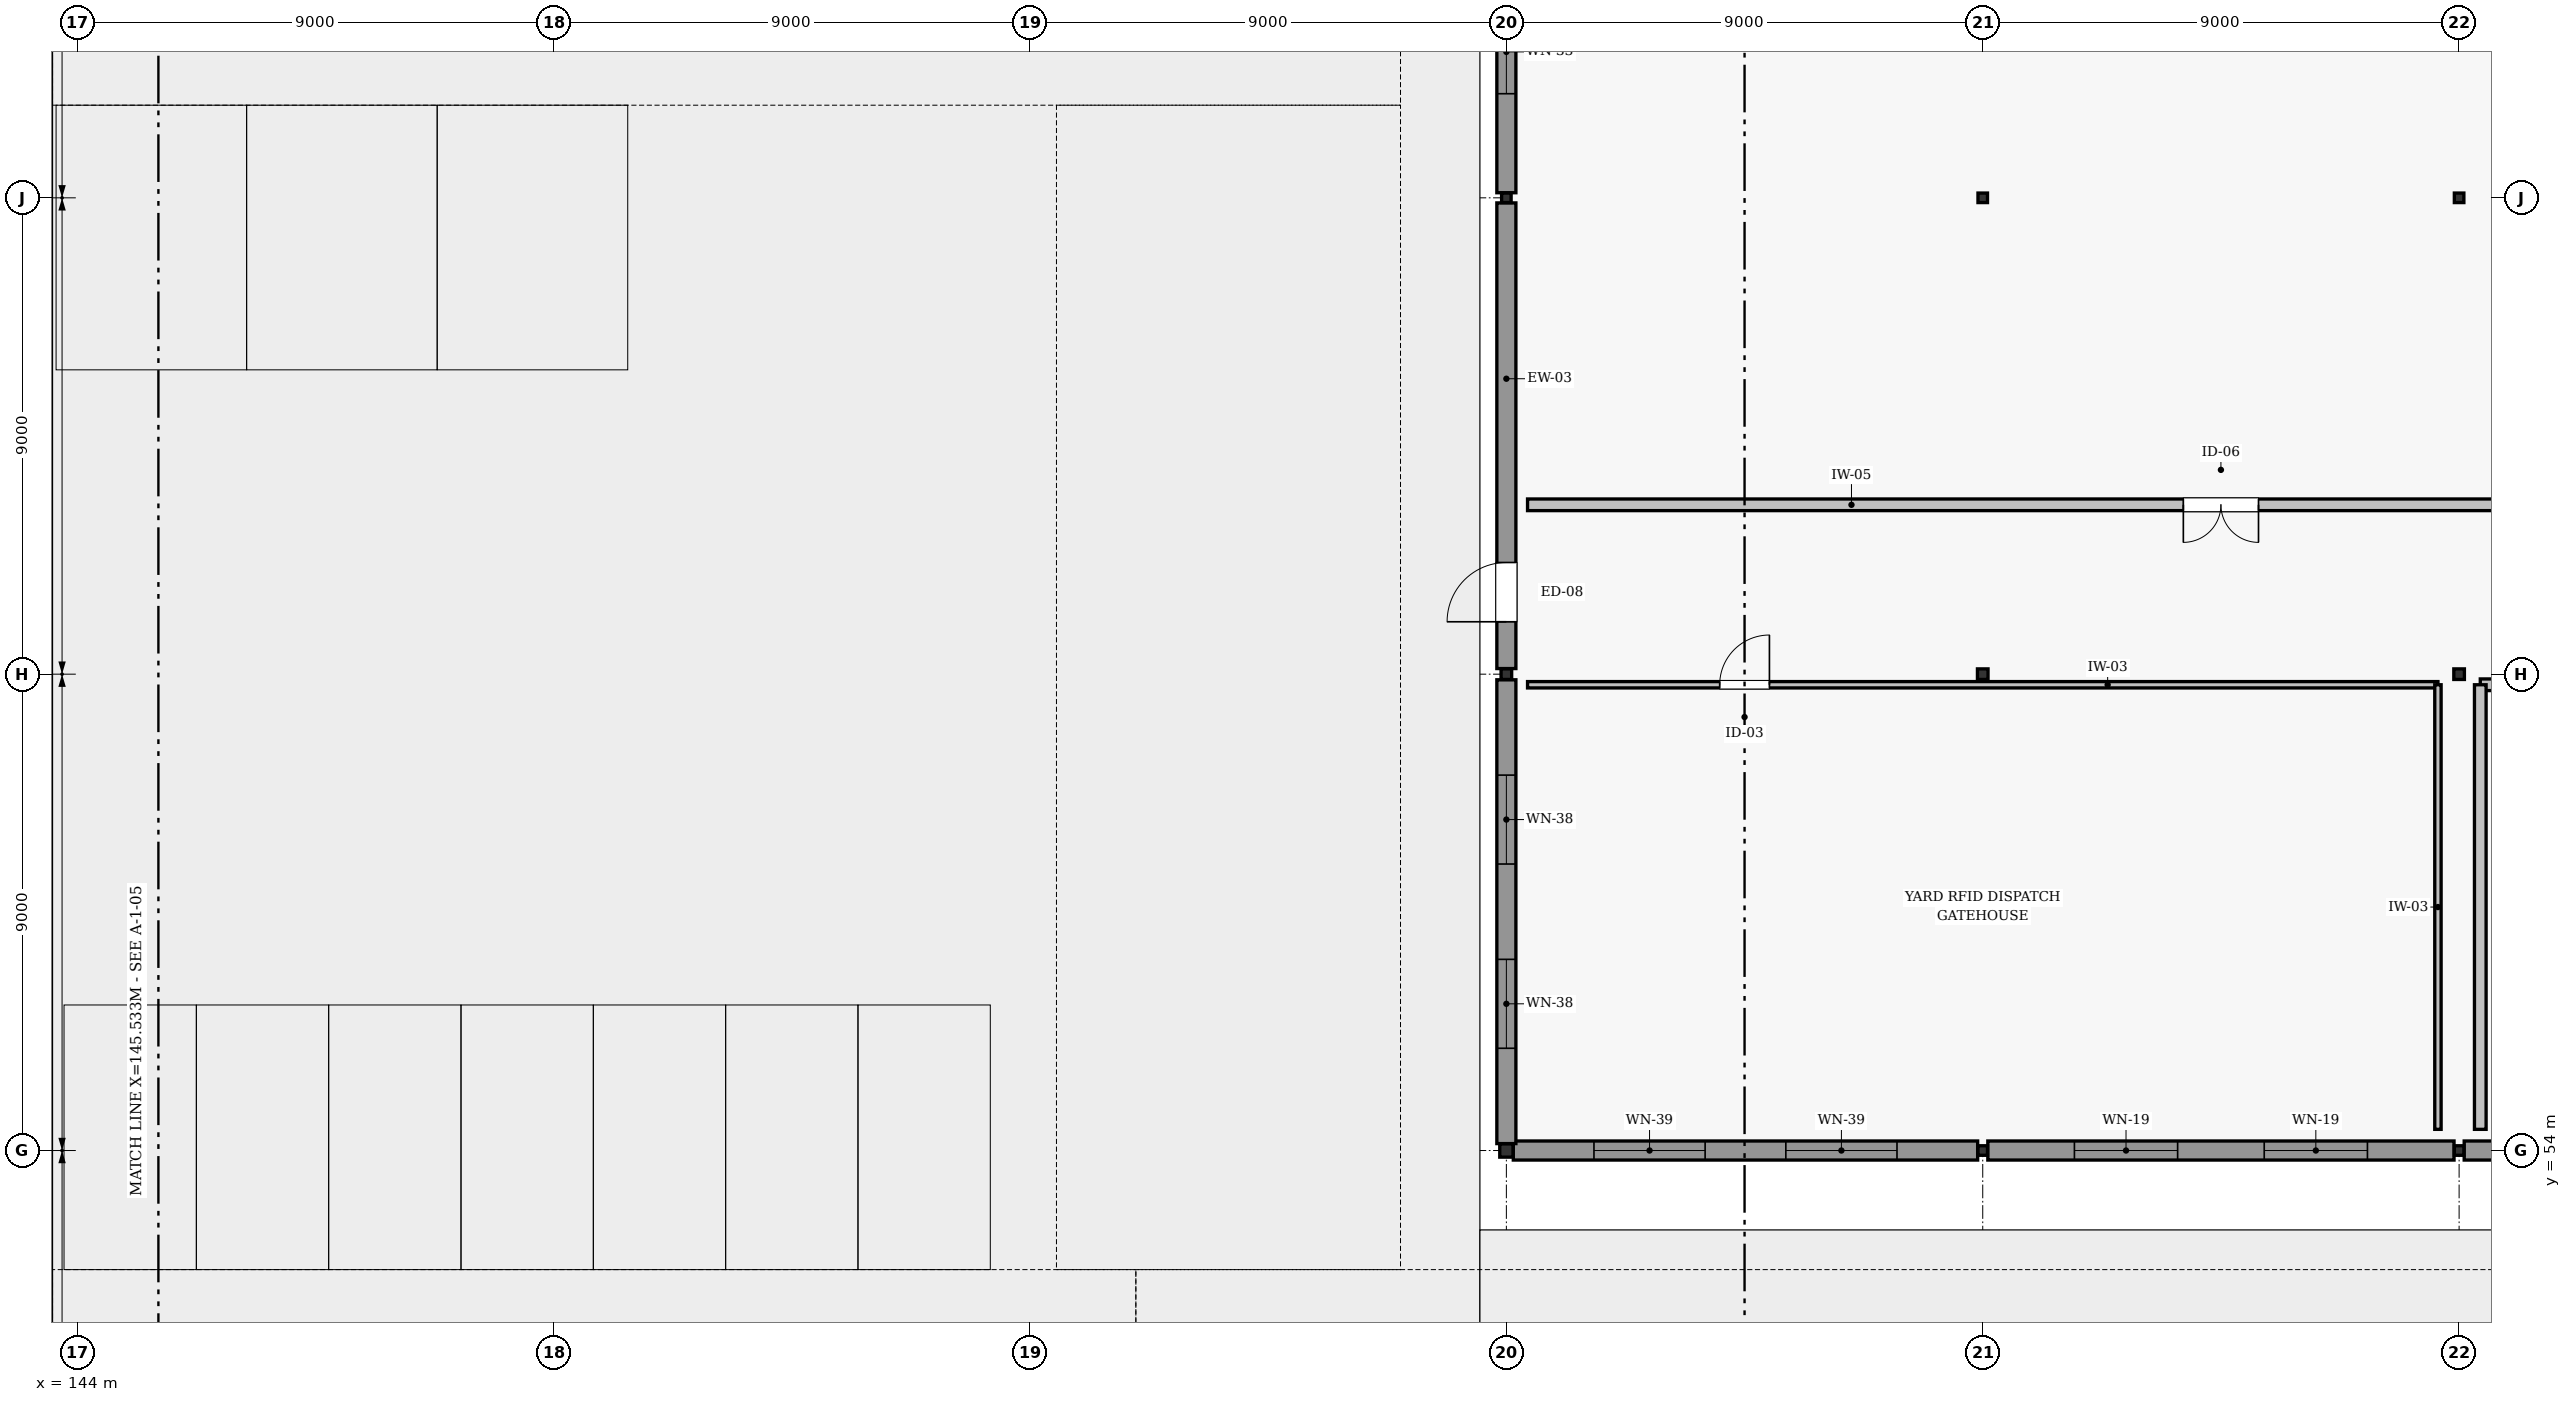
"""IFC4 building model, lengths in metres.
Left out: names, types, materials, properties, quantities, classifications, styles, units other than length and angle.
Written with IfcOpenShell. Run it as: python <this file> out.ifc"""

import sys

from ifc_helpers import new_model, si_unit, direction, frame, frame_2d, origin, origin_2d, place, context, subcontext, project, spatial, rectangle, hollow_rectangle, extrude, element, fill, save


model = new_model("IFC4")
c1 = context("Model", 3, precision=1e-05, world=origin(), true_north=direction((0.0, 1.0)))
c2 = subcontext(c1, "Body", "Model", "MODEL_VIEW")
j1 = project(units=[si_unit("LENGTHUNIT", "METRE"), si_unit("PLANEANGLEUNIT", "RADIAN")], contexts=[c1])
p1 = place(None, origin())
s1 = spatial("IfcSite", under=j1, at=p1, CompositionType="ELEMENT")
p2 = place(p1, origin())
s2 = spatial("IfcBuilding", under=s1, at=p2, CompositionType="ELEMENT")
p3 = place(p2, origin())
s3 = spatial("IfcBuildingStorey", under=s2, at=p3, CompositionType="ELEMENT", Elevation=0.0)
p4 = place(p3, frame((171.0, 54.0, 0.0), z_axis=(0.0, 0.0, 1.0), x_axis=(1.0, 0.0, 0.0)))
e1 = element("IfcColumn", 1, at=p4, inside=s3, PredefinedType="COLUMN", context=c2, shape_type="SweptSolid", body=[
    extrude(hollow_rectangle(XDim=0.25, YDim=0.25, WallThickness=0.01, InnerFilletRadius=0.01, OuterFilletRadius=0.02, at=origin_2d()), origin(), (0.0, 0.0, 1.0), 4.8),
])
p5 = place(p3, frame((171.0, 63.0, 0.0), z_axis=(0.0, 0.0, 1.0), x_axis=(1.0, 0.0, 0.0)))
e2 = element("IfcColumn", 2, at=p5, inside=s3, PredefinedType="COLUMN", context=c2, shape_type="SweptSolid", body=[
    extrude(hollow_rectangle(XDim=0.2, YDim=0.2, WallThickness=0.008, InnerFilletRadius=0.008, OuterFilletRadius=0.016, at=origin_2d()), origin(), (0.0, 0.0, 1.0), 4.8),
])
for number, where, z_axis, x_axis in (
    (3, (171.0, 72.0, 0.0), (0.0, 0.0, 1.0), (1.0, 0.0, 0.0)),
    (4, (180.0, 54.0, 0.0), (0.0, 0.0, 1.0), (1.0, 0.0, 0.0)),
):
    element("IfcColumn", number, at=place(p3, frame(where, z_axis=z_axis, x_axis=x_axis)), inside=s3, PredefinedType="COLUMN", context=c2, shape_type="SweptSolid", body=[
        extrude(hollow_rectangle(XDim=0.18, YDim=0.18, WallThickness=0.008, InnerFilletRadius=0.008, OuterFilletRadius=0.016, at=origin_2d()), origin(), (0.0, 0.0, 1.0), 4.8),
    ])
p6 = place(p3, frame((180.0, 63.0, 0.0), z_axis=(0.0, 0.0, 1.0), x_axis=(1.0, 0.0, 0.0)))
e5 = element("IfcColumn", 5, at=p6, inside=s3, PredefinedType="COLUMN", context=c2, shape_type="SweptSolid", body=[
    extrude(hollow_rectangle(XDim=0.2, YDim=0.2, WallThickness=0.008, InnerFilletRadius=0.008, OuterFilletRadius=0.016, at=origin_2d()), origin(), (0.0, 0.0, 1.0), 4.8),
])
for number, where, z_axis, x_axis in (
    (6, (180.0, 72.0, 0.0), (0.0, 0.0, 1.0), (1.0, 0.0, 0.0)),
    (7, (189.0, 54.0, 0.0), (0.0, 0.0, 1.0), (1.0, 0.0, 0.0)),
):
    element("IfcColumn", number, at=place(p3, frame(where, z_axis=z_axis, x_axis=x_axis)), inside=s3, PredefinedType="COLUMN", context=c2, shape_type="SweptSolid", body=[
        extrude(hollow_rectangle(XDim=0.18, YDim=0.18, WallThickness=0.008, InnerFilletRadius=0.008, OuterFilletRadius=0.016, at=origin_2d()), origin(), (0.0, 0.0, 1.0), 4.8),
    ])
p7 = place(p3, frame((189.0, 63.0, 0.0), z_axis=(0.0, 0.0, 1.0), x_axis=(1.0, 0.0, 0.0)))
e8 = element("IfcColumn", 8, at=p7, inside=s3, PredefinedType="COLUMN", context=c2, shape_type="SweptSolid", body=[
    extrude(hollow_rectangle(XDim=0.2, YDim=0.2, WallThickness=0.008, InnerFilletRadius=0.008, OuterFilletRadius=0.016, at=origin_2d()), origin(), (0.0, 0.0, 1.0), 4.8),
])
p8 = place(p3, frame((189.0, 72.0, 0.0), z_axis=(0.0, 0.0, 1.0), x_axis=(1.0, 0.0, 0.0)))
e9 = element("IfcColumn", 9, at=p8, inside=s3, PredefinedType="COLUMN", context=c2, shape_type="SweptSolid", body=[
    extrude(hollow_rectangle(XDim=0.18, YDim=0.18, WallThickness=0.008, InnerFilletRadius=0.008, OuterFilletRadius=0.016, at=origin_2d()), origin(), (0.0, 0.0, 1.0), 4.8),
])
p9 = place(p3, frame((171.131, 54.0, 0.0), z_axis=(0.0, 0.0, 1.0), x_axis=(1.0, 0.0, 0.0)))
e10 = element("IfcWall", 10, at=p9, inside=s3, PredefinedType="SOLIDWALL", context=c2, shape_type="SweptSolid", body=[
    extrude(rectangle(XDim=8.773, YDim=0.36, at=frame_2d((4.386, 0.0))), origin(), (0.0, 0.0, 1.0), 4.142),
])
p10 = place(p9, frame((1.524, 0.0, 0.75)))
e11 = element("IfcOpeningElement", 11, at=p10, cuts=e10, PredefinedType="OPENING", context=c2, shape_type="SweptSolid", body=[
    extrude(rectangle(XDim=2.1, YDim=2.12, at=frame_2d((1.05, 1.06))), frame((0.0, 0.19, 0.0), z_axis=(0.0, -1.0, 0.0), x_axis=(1.0, 0.0, 0.0)), (0.0, 0.0, 1.0), 0.38),
])
p11 = place(p9, frame((5.149, 0.0, 0.75)))
e12 = element("IfcOpeningElement", 12, at=p11, cuts=e10, PredefinedType="OPENING", context=c2, shape_type="SweptSolid", body=[
    extrude(rectangle(XDim=2.1, YDim=2.12, at=frame_2d((1.05, 1.06))), frame((0.0, 0.19, 0.0), z_axis=(0.0, -1.0, 0.0), x_axis=(1.0, 0.0, 0.0)), (0.0, 0.0, 1.0), 0.38),
])
p12 = place(p3, frame((180.096, 54.0, 0.0), z_axis=(0.0, 0.0, 1.0), x_axis=(1.0, 0.0, 0.0)))
e13 = element("IfcWall", 13, at=p12, inside=s3, PredefinedType="SOLIDWALL", context=c2, shape_type="SweptSolid", body=[
    extrude(rectangle(XDim=8.808, YDim=0.36, at=frame_2d((4.404, 0.0))), origin(), (0.0, 0.0, 1.0), 4.142),
])
p13 = place(p12, frame((1.636, 0.0, 0.8)))
e14 = element("IfcOpeningElement", 14, at=p13, cuts=e13, PredefinedType="OPENING", context=c2, shape_type="SweptSolid", body=[
    extrude(rectangle(XDim=1.95, YDim=2.05, at=frame_2d((0.975, 1.025))), frame((0.0, 0.19, 0.0), z_axis=(0.0, -1.0, 0.0), x_axis=(1.0, 0.0, 0.0)), (0.0, 0.0, 1.0), 0.38),
])
p14 = place(p12, frame((5.222, 0.0, 0.8)))
e15 = element("IfcOpeningElement", 15, at=p14, cuts=e13, PredefinedType="OPENING", context=c2, shape_type="SweptSolid", body=[
    extrude(rectangle(XDim=1.95, YDim=2.05, at=frame_2d((0.975, 1.025))), frame((0.0, 0.19, 0.0), z_axis=(0.0, -1.0, 0.0), x_axis=(1.0, 0.0, 0.0)), (0.0, 0.0, 1.0), 0.38),
])
p15 = place(p3, frame((189.096, 54.0, 0.0), z_axis=(0.0, 0.0, 1.0), x_axis=(1.0, 0.0, 0.0)))
e16 = element("IfcWall", 16, at=p15, inside=s3, PredefinedType="SOLIDWALL", context=c2, shape_type="SweptSolid", body=[
    extrude(rectangle(XDim=8.808, YDim=0.36, at=frame_2d((4.404, 0.0))), origin(), (0.0, 0.0, 1.0), 4.142),
])
p16 = place(p15, frame((1.703, 0.0, 0.8)))
e17 = element("IfcOpeningElement", 17, at=p16, cuts=e16, PredefinedType="OPENING", context=c2, shape_type="SweptSolid", body=[
    extrude(rectangle(XDim=1.85, YDim=1.98, at=frame_2d((0.925, 0.99))), frame((0.0, 0.19, 0.0), z_axis=(0.0, -1.0, 0.0), x_axis=(1.0, 0.0, 0.0)), (0.0, 0.0, 1.0), 0.38),
])
p17 = place(p15, frame((5.255, 0.0, 0.8)))
e18 = element("IfcOpeningElement", 18, at=p17, cuts=e16, PredefinedType="OPENING", context=c2, shape_type="SweptSolid", body=[
    extrude(rectangle(XDim=1.85, YDim=1.98, at=frame_2d((0.925, 0.99))), frame((0.0, 0.19, 0.0), z_axis=(0.0, -1.0, 0.0), x_axis=(1.0, 0.0, 0.0)), (0.0, 0.0, 1.0), 0.38),
])
p18 = place(p3, frame((171.0, 54.131, 0.0), z_axis=(0.0, 0.0, 1.0), x_axis=(0.0, 1.0, 0.0)))
e19 = element("IfcWall", 19, at=p18, inside=s3, PredefinedType="SOLIDWALL", context=c2, shape_type="SweptSolid", body=[
    extrude(rectangle(XDim=8.763, YDim=0.36, at=frame_2d((4.381, 0.0))), origin(), (0.0, 0.0, 1.0), 4.142),
])
p19 = place(p18, frame((1.801, 0.0, 0.85)))
e20 = element("IfcOpeningElement", 20, at=p19, cuts=e19, PredefinedType="OPENING", context=c2, shape_type="SweptSolid", body=[
    extrude(rectangle(XDim=1.68, YDim=1.66, at=frame_2d((0.84, 0.83))), frame((0.0, 0.19, 0.0), z_axis=(0.0, -1.0, 0.0), x_axis=(1.0, 0.0, 0.0)), (0.0, 0.0, 1.0), 0.38),
])
p20 = place(p18, frame((5.282, 0.0, 0.85)))
e21 = element("IfcOpeningElement", 21, at=p20, cuts=e19, PredefinedType="OPENING", context=c2, shape_type="SweptSolid", body=[
    extrude(rectangle(XDim=1.68, YDim=1.66, at=frame_2d((0.84, 0.83))), frame((0.0, 0.19, 0.0), z_axis=(0.0, -1.0, 0.0), x_axis=(1.0, 0.0, 0.0)), (0.0, 0.0, 1.0), 0.38),
])
p21 = place(p3, frame((171.0, 63.106, 0.0), z_axis=(0.0, 0.0, 1.0), x_axis=(0.0, 1.0, 0.0)))
e22 = element("IfcWall", 22, at=p21, inside=s3, PredefinedType="SOLIDWALL", context=c2, shape_type="SweptSolid", body=[
    extrude(rectangle(XDim=8.798, YDim=0.36, at=frame_2d((4.399, 0.0))), origin(), (0.0, 0.0, 1.0), 4.142),
])
p22 = place(p21, frame((0.884, 0.0, 0.0)))
e23 = element("IfcOpeningElement", 23, at=p22, cuts=e22, PredefinedType="OPENING", context=c2, shape_type="SweptSolid", body=[
    extrude(rectangle(XDim=1.12, YDim=2.14, at=frame_2d((0.56, 1.07))), frame((0.0, 0.19, 0.0), z_axis=(0.0, -1.0, 0.0), x_axis=(1.0, 0.0, 0.0)), (0.0, 0.0, 1.0), 0.38),
])
p23 = place(p3, frame((171.0, 72.096, 0.0), z_axis=(0.0, 0.0, 1.0), x_axis=(0.0, 1.0, 0.0)))
e24 = element("IfcWall", 24, at=p23, inside=s3, PredefinedType="SOLIDWALL", context=c2, shape_type="SweptSolid", body=[
    extrude(rectangle(XDim=8.773, YDim=0.36, at=frame_2d((4.386, 0.0))), origin(), (0.0, 0.0, 1.0), 4.142),
])
p24 = place(p23, frame((1.871, 0.0, 0.85)))
e25 = element("IfcOpeningElement", 25, at=p24, cuts=e24, PredefinedType="OPENING", context=c2, shape_type="SweptSolid", body=[
    extrude(rectangle(XDim=1.58, YDim=1.6, at=frame_2d((0.79, 0.8))), frame((0.0, 0.19, 0.0), z_axis=(0.0, -1.0, 0.0), x_axis=(1.0, 0.0, 0.0)), (0.0, 0.0, 1.0), 0.38),
])
p25 = place(p23, frame((5.322, 0.0, 0.85)))
e26 = element("IfcOpeningElement", 26, at=p25, cuts=e24, PredefinedType="OPENING", context=c2, shape_type="SweptSolid", body=[
    extrude(rectangle(XDim=1.58, YDim=1.6, at=frame_2d((0.79, 0.8))), frame((0.0, 0.19, 0.0), z_axis=(0.0, -1.0, 0.0), x_axis=(1.0, 0.0, 0.0)), (0.0, 0.0, 1.0), 0.38),
])
p26 = place(p3, frame((171.4, 62.8, 0.0), z_axis=(0.0, 0.0, 1.0), x_axis=(1.0, 0.0, 0.0)))
e27 = element("IfcWall", 27, at=p26, inside=s3, PredefinedType="PARTITIONING", context=c2, shape_type="SweptSolid", body=[
    extrude(rectangle(XDim=17.2, YDim=0.12, at=frame_2d((8.6, 0.0))), origin(), (0.0, 0.0, 1.0), 4.145),
])
p27 = place(p26, frame((3.63, 0.0, 0.0)))
e28 = element("IfcOpeningElement", 28, at=p27, cuts=e27, PredefinedType="OPENING", context=c2, shape_type="SweptSolid", body=[
    extrude(rectangle(XDim=0.94, YDim=2.06, at=frame_2d((0.47, 1.03))), frame((0.0, 0.07, 0.0), z_axis=(0.0, -1.0, 0.0), x_axis=(1.0, 0.0, 0.0)), (0.0, 0.0, 1.0), 0.14),
])
p28 = place(p3, frame((188.6, 54.4, 0.0), z_axis=(0.0, 0.0, 1.0), x_axis=(0.0, 1.0, 0.0)))
e29 = element("IfcWall", 29, at=p28, inside=s3, PredefinedType="PARTITIONING", context=c2, shape_type="SweptSolid", body=[
    extrude(rectangle(XDim=8.4, YDim=0.12, at=frame_2d((4.2, 0.0))), origin(), (0.0, 0.0, 1.0), 4.55),
])
p29 = place(p3, frame((189.4, 62.8, 0.0), z_axis=(0.0, 0.0, 1.0), x_axis=(1.0, 0.0, 0.0)))
e30 = element("IfcWall", 30, at=p29, inside=s3, PredefinedType="SOLIDWALL", context=c2, shape_type="SweptSolid", body=[
    extrude(rectangle(XDim=26.2, YDim=0.22, at=frame_2d((13.1, 0.0))), origin(), (0.0, 0.0, 1.0), 4.145),
])
p30 = place(p29, frame((12.34, 0.0, 0.0)))
e31 = element("IfcOpeningElement", 31, at=p30, cuts=e30, PredefinedType="OPENING", context=c2, shape_type="SweptSolid", body=[
    extrude(rectangle(XDim=1.52, YDim=2.16, at=frame_2d((0.76, 1.08))), frame((0.0, 0.12, 0.0), z_axis=(0.0, -1.0, 0.0), x_axis=(1.0, 0.0, 0.0)), (0.0, 0.0, 1.0), 0.24),
])
p31 = place(p3, frame((189.4, 54.4, 0.0), z_axis=(0.0, 0.0, 1.0), x_axis=(0.0, 1.0, 0.0)))
e32 = element("IfcWall", 32, at=p31, inside=s3, PredefinedType="SOLIDWALL", context=c2, shape_type="SweptSolid", body=[
    extrude(rectangle(XDim=8.4, YDim=0.22, at=frame_2d((4.2, 0.0))), origin(), (0.0, 0.0, 1.0), 4.55),
])
p32 = place(p3, frame((171.4, 66.2, 0.0), z_axis=(0.0, 0.0, 1.0), x_axis=(1.0, 0.0, 0.0)))
e33 = element("IfcWall", 33, at=p32, inside=s3, PredefinedType="SOLIDWALL", context=c2, shape_type="SweptSolid", body=[
    extrude(rectangle(XDim=26.2, YDim=0.22, at=frame_2d((13.1, 0.0))), origin(), (0.0, 0.0, 1.0), 4.145),
])
p33 = place(p32, frame((12.39, 0.0, 0.0)))
e34 = element("IfcOpeningElement", 34, at=p33, cuts=e33, PredefinedType="OPENING", context=c2, shape_type="SweptSolid", body=[
    extrude(rectangle(XDim=1.42, YDim=2.12, at=frame_2d((0.71, 1.06))), frame((0.0, 0.12, 0.0), z_axis=(0.0, -1.0, 0.0), x_axis=(1.0, 0.0, 0.0)), (0.0, 0.0, 1.0), 0.24),
])
p34 = place(p10, origin())
e35 = element("IfcWindow", 35, at=p34, inside=s3, PartitioningType="SINGLE_PANEL", PredefinedType="WINDOW", context=c2, shape_type="SweptSolid", body=[
    extrude(rectangle(XDim=2.1, YDim=2.12, at=frame_2d((1.05, 1.06))), frame((0.0, 0.03, 0.0), z_axis=(0.0, -1.0, 0.0), x_axis=(1.0, 0.0, 0.0)), (0.0, 0.0, 1.0), 0.06),
])
fill(e11, e35)
p35 = place(p11, origin())
e36 = element("IfcWindow", 36, at=p35, inside=s3, PartitioningType="SINGLE_PANEL", PredefinedType="WINDOW", context=c2, shape_type="SweptSolid", body=[
    extrude(rectangle(XDim=2.1, YDim=2.12, at=frame_2d((1.05, 1.06))), frame((0.0, 0.03, 0.0), z_axis=(0.0, -1.0, 0.0), x_axis=(1.0, 0.0, 0.0)), (0.0, 0.0, 1.0), 0.06),
])
fill(e12, e36)
p36 = place(p13, origin())
e37 = element("IfcWindow", 37, at=p36, inside=s3, PartitioningType="SINGLE_PANEL", PredefinedType="WINDOW", context=c2, shape_type="SweptSolid", body=[
    extrude(rectangle(XDim=1.95, YDim=2.05, at=frame_2d((0.975, 1.025))), frame((0.0, 0.03, 0.0), z_axis=(0.0, -1.0, 0.0), x_axis=(1.0, 0.0, 0.0)), (0.0, 0.0, 1.0), 0.06),
])
fill(e14, e37)
p37 = place(p14, origin())
e38 = element("IfcWindow", 38, at=p37, inside=s3, PartitioningType="SINGLE_PANEL", PredefinedType="WINDOW", context=c2, shape_type="SweptSolid", body=[
    extrude(rectangle(XDim=1.95, YDim=2.05, at=frame_2d((0.975, 1.025))), frame((0.0, 0.03, 0.0), z_axis=(0.0, -1.0, 0.0), x_axis=(1.0, 0.0, 0.0)), (0.0, 0.0, 1.0), 0.06),
])
fill(e15, e38)
p38 = place(p19, origin())
e39 = element("IfcWindow", 39, at=p38, inside=s3, PartitioningType="SINGLE_PANEL", PredefinedType="WINDOW", context=c2, shape_type="SweptSolid", body=[
    extrude(rectangle(XDim=1.68, YDim=1.66, at=frame_2d((0.84, 0.83))), frame((0.0, 0.03, 0.0), z_axis=(0.0, -1.0, 0.0), x_axis=(1.0, 0.0, 0.0)), (0.0, 0.0, 1.0), 0.06),
])
fill(e20, e39)
p39 = place(p20, origin())
e40 = element("IfcWindow", 40, at=p39, inside=s3, PartitioningType="SINGLE_PANEL", PredefinedType="WINDOW", context=c2, shape_type="SweptSolid", body=[
    extrude(rectangle(XDim=1.68, YDim=1.66, at=frame_2d((0.84, 0.83))), frame((0.0, 0.03, 0.0), z_axis=(0.0, -1.0, 0.0), x_axis=(1.0, 0.0, 0.0)), (0.0, 0.0, 1.0), 0.06),
])
fill(e21, e40)
p40 = place(p22, origin())
e41 = element("IfcDoor", 41, at=p40, inside=s3, OperationType="SINGLE_SWING_LEFT", PredefinedType="DOOR", context=c2, shape_type="SweptSolid", body=[
    extrude(rectangle(XDim=1.12, YDim=2.14, at=frame_2d((0.56, 1.07))), frame((0.0, 0.025, 0.0), z_axis=(0.0, -1.0, 0.0), x_axis=(1.0, 0.0, 0.0)), (0.0, 0.0, 1.0), 0.05),
])
fill(e23, e41)
p41 = place(p24, origin())
e42 = element("IfcWindow", 42, at=p41, inside=s3, PartitioningType="SINGLE_PANEL", PredefinedType="WINDOW", context=c2, shape_type="SweptSolid", body=[
    extrude(rectangle(XDim=1.58, YDim=1.6, at=frame_2d((0.79, 0.8))), frame((0.0, 0.03, 0.0), z_axis=(0.0, -1.0, 0.0), x_axis=(1.0, 0.0, 0.0)), (0.0, 0.0, 1.0), 0.06),
])
fill(e25, e42)
p42 = place(p27, origin())
e43 = element("IfcDoor", 43, at=p42, inside=s3, OperationType="SINGLE_SWING_RIGHT", PredefinedType="DOOR", context=c2, shape_type="SweptSolid", body=[
    extrude(rectangle(XDim=0.94, YDim=2.06, at=frame_2d((0.47, 1.03))), frame((0.0, 0.025, 0.0), z_axis=(0.0, -1.0, 0.0), x_axis=(1.0, 0.0, 0.0)), (0.0, 0.0, 1.0), 0.05),
])
fill(e28, e43)
p43 = place(p33, frame((1.42, 0.0, 0.0), z_axis=(0.0, 0.0, 1.0), x_axis=(-1.0, 0.0, 0.0)))
e44 = element("IfcDoor", 44, at=p43, inside=s3, OperationType="DOUBLE_SWING_LEFT", PredefinedType="DOOR", context=c2, shape_type="SweptSolid", body=[
    extrude(rectangle(XDim=1.42, YDim=2.12, at=frame_2d((0.71, 1.06))), frame((0.0, 0.025, 0.0), z_axis=(0.0, -1.0, 0.0), x_axis=(1.0, 0.0, 0.0)), (0.0, 0.0, 1.0), 0.05),
])
fill(e34, e44)
save(model, sys.argv[1])
